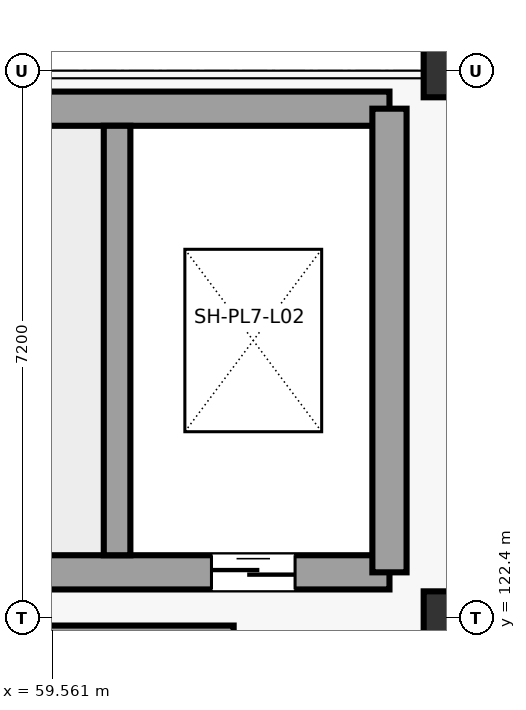
"""IFC4 building model, lengths in metres.
Left out: names, types, materials, properties, quantities, classifications, styles, units other than length and angle.
Written with IfcOpenShell. Run it as: python <this file> out.ifc"""

import sys

from ifc_helpers import new_model, si_unit, direction, frame, frame_2d, origin, origin_2d, place, context, subcontext, project, spatial, rectangle, extrude, element, fill, save


model = new_model("IFC4")
c1 = context("Model", 3, precision=1e-05, world=origin(), true_north=direction((0.0, 1.0)))
c2 = subcontext(c1, "Body", "Model", "MODEL_VIEW")
j1 = project(units=[si_unit("LENGTHUNIT", "METRE"), si_unit("PLANEANGLEUNIT", "RADIAN")], contexts=[c1])
p1 = place(None, origin())
s1 = spatial("IfcSite", under=j1, at=p1, CompositionType="ELEMENT")
p2 = place(p1, origin())
s2 = spatial("IfcBuilding", under=s1, at=p2, CompositionType="ELEMENT")
p3 = place(p2, frame((0.0, 0.0, 9.6)))
s3 = spatial("IfcBuildingStorey", under=s2, at=p3, CompositionType="ELEMENT", Elevation=9.6)
for number, where, z_axis, x_axis in (
    (1, (64.8, 122.4, 0.0), (0.0, 0.0, 1.0), (1.0, 0.0, 0.0)),
    (2, (64.8, 129.6, 0.0), (0.0, 0.0, 1.0), (1.0, 0.0, 0.0)),
):
    element("IfcColumn", number, at=place(p3, frame(where, z_axis=z_axis, x_axis=x_axis)), inside=s3, PredefinedType="COLUMN", context=c2, shape_type="SweptSolid", body=[
        extrude(rectangle(XDim=0.7, YDim=0.7, at=origin_2d()), origin(), (0.0, 0.0, 1.0), 4.2),
    ])
p4 = place(p3, frame((51.2, 123.0, 0.0), z_axis=(0.0, 0.0, 1.0), x_axis=(1.0, 0.0, 0.0)))
e3 = element("IfcWall", 3, at=p4, inside=s3, PredefinedType="SHEAR", context=c2, shape_type="SweptSolid", body=[
    extrude(rectangle(XDim=12.8, YDim=0.45, at=frame_2d((6.4, 0.0))), origin(), (0.0, 0.0, 1.0), 3.88),
])
p5 = place(p4, frame((0.55, 0.0, 0.0)))
e4 = element("IfcOpeningElement", 4, at=p5, cuts=e3, PredefinedType="OPENING", context=c2, shape_type="SweptSolid", body=[
    extrude(rectangle(XDim=1.2, YDim=2.25, at=frame_2d((0.6, 1.125))), frame((0.0, 0.235, 0.0), z_axis=(0.0, -1.0, 0.0), x_axis=(1.0, 0.0, 0.0)), (0.0, 0.0, 1.0), 0.47),
])
p6 = place(p4, frame((10.458, 0.0, 0.0)))
e5 = element("IfcOpeningElement", 5, at=p6, cuts=e3, PredefinedType="OPENING", context=c2, shape_type="SweptSolid", body=[
    extrude(rectangle(XDim=1.1, YDim=2.2, at=frame_2d((0.55, 1.1))), frame((0.0, 0.235, 0.0), z_axis=(0.0, -1.0, 0.0), x_axis=(1.0, 0.0, 0.0)), (0.0, 0.0, 1.0), 0.47),
])
p7 = place(p3, frame((51.2, 129.1, 0.0), z_axis=(0.0, 0.0, 1.0), x_axis=(1.0, 0.0, 0.0)))
e6 = element("IfcWall", 6, at=p7, inside=s3, PredefinedType="SHEAR", context=c2, shape_type="SweptSolid", body=[
    extrude(rectangle(XDim=12.8, YDim=0.45, at=frame_2d((6.4, 0.0))), origin(), (0.0, 0.0, 1.0), 3.88),
])
p8 = place(p3, frame((64.0, 123.0, 0.0), z_axis=(0.0, 0.0, 1.0), x_axis=(0.0, 1.0, 0.0)))
e7 = element("IfcWall", 7, at=p8, inside=s3, PredefinedType="SHEAR", context=c2, shape_type="SweptSolid", body=[
    extrude(rectangle(XDim=6.1, YDim=0.45, at=frame_2d((3.05, 0.0))), origin(), (0.0, 0.0, 1.0), 3.88),
])
p9 = place(p3, frame((60.416, 123.225, 0.0), z_axis=(0.0, 0.0, 1.0), x_axis=(0.0, 1.0, 0.0)))
e8 = element("IfcWall", 8, at=p9, inside=s3, PredefinedType="SHEAR", context=c2, shape_type="SweptSolid", body=[
    extrude(rectangle(XDim=5.65, YDim=0.35, at=frame_2d((2.825, 0.0))), origin(), (0.0, 0.0, 1.0), 3.88),
])
p10 = place(p3, frame((61.95, 122.2, 0.0), z_axis=(0.0, 0.0, 1.0), x_axis=(-1.0, 0.0, 0.0)))
e9 = element("IfcWall", 9, at=p10, inside=s3, PredefinedType="PARTITIONING", context=c2, shape_type="SweptSolid", body=[
    extrude(rectangle(XDim=3.45, YDim=0.2, at=frame_2d((1.725, 0.0))), origin(), (0.0, 0.0, 1.0), 2.94),
])
p11 = place(p6, origin())
e10 = element("IfcDoor", 10, at=p11, inside=s3, OperationType="SLIDING_TO_LEFT", PredefinedType="DOOR", context=c2, shape_type="SweptSolid", body=[
    extrude(rectangle(XDim=1.1, YDim=2.2, at=frame_2d((0.55, 1.1))), frame((0.0, 0.025, 0.0), z_axis=(0.0, -1.0, 0.0), x_axis=(1.0, 0.0, 0.0)), (0.0, 0.0, 1.0), 0.05),
])
fill(e5, e10)
save(model, sys.argv[1])
